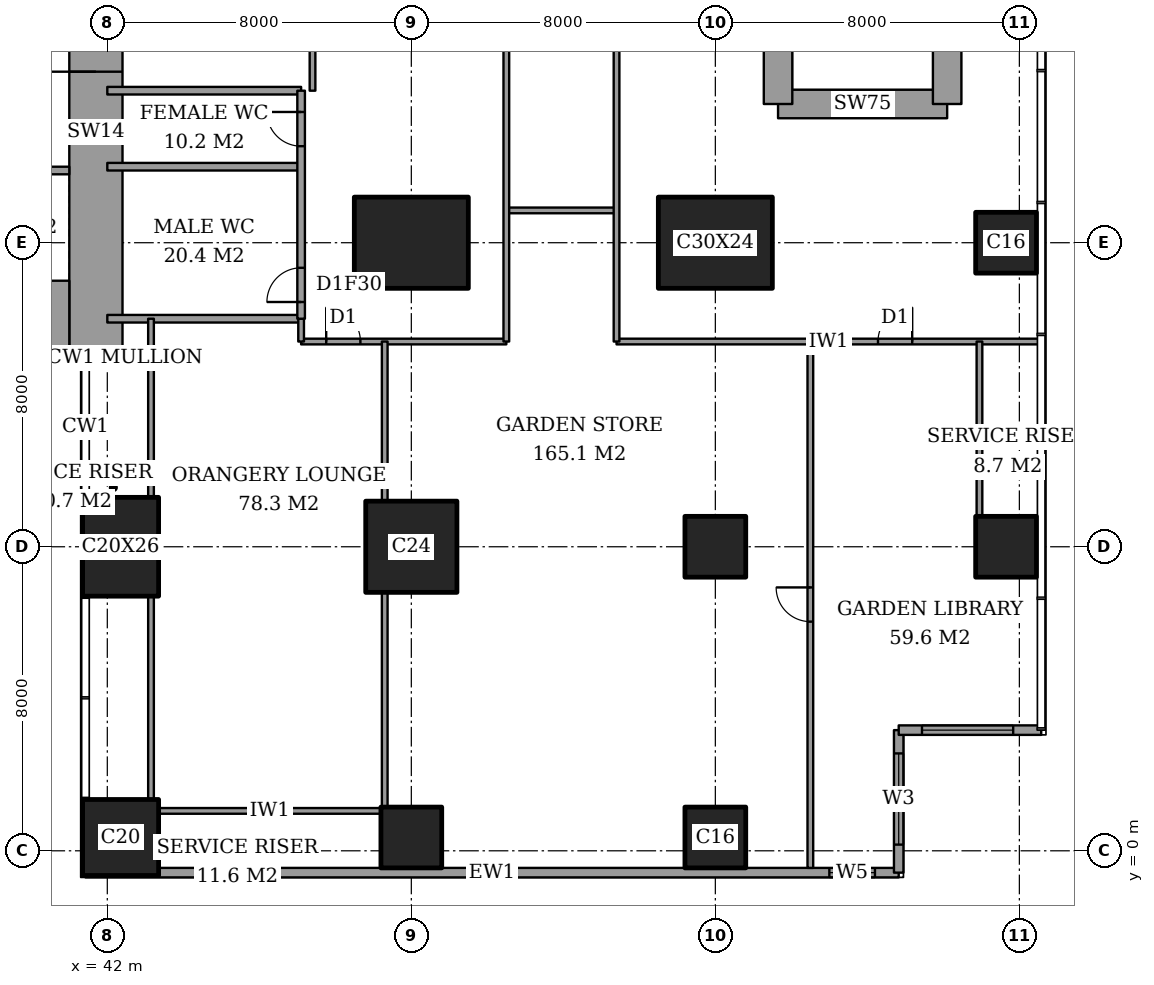
"""IFC4 building model, lengths in metres.
Left out: names, types, materials, properties, quantities, classifications, styles, units other than length and angle.
Written with IfcOpenShell. Run it as: python <this file> out.ifc"""

import sys

from ifc_helpers import new_model, si_unit, direction, frame, frame_2d, origin, origin_2d, place, context, subcontext, project, spatial, rectangle, extrude, element, fill, save


model = new_model("IFC4")
c1 = context("Model", 3, precision=1e-05, world=origin(), true_north=direction((0.0, 1.0)))
c2 = subcontext(c1, "Body", "Model", "MODEL_VIEW")
j1 = project(units=[si_unit("LENGTHUNIT", "METRE"), si_unit("PLANEANGLEUNIT", "RADIAN")], contexts=[c1])
p1 = place(None, origin())
s1 = spatial("IfcSite", under=j1, at=p1, CompositionType="ELEMENT")
p2 = place(p1, origin())
s2 = spatial("IfcBuilding", under=s1, at=p2, CompositionType="ELEMENT")
p3 = place(p2, frame((0.0, 0.0, 225.4)))
s3 = spatial("IfcBuildingStorey", under=s2, at=p3, CompositionType="ELEMENT", Elevation=225.4)
p4 = place(p3, frame((42.35, 0.35, 0.0), z_axis=(0.0, 0.0, 1.0), x_axis=(1.0, 0.0, 0.0)))
e1 = element("IfcColumn", 1, at=p4, inside=s3, PredefinedType="COLUMN", context=c2, shape_type="SweptSolid", body=[
    extrude(rectangle(XDim=2.0, YDim=2.0, at=origin_2d()), origin(), (0.0, 0.0, 1.0), 5.0),
])
p5 = place(p3, frame((42.35, 8.0, 0.0), z_axis=(0.0, 0.0, 1.0), x_axis=(1.0, 0.0, 0.0)))
e2 = element("IfcColumn", 2, at=p5, inside=s3, PredefinedType="COLUMN", context=c2, shape_type="SweptSolid", body=[
    extrude(rectangle(XDim=2.0, YDim=2.6, at=origin_2d()), origin(), (0.0, 0.0, 1.0), 5.0),
])
p6 = place(p3, frame((50.0, 0.35, 0.0), z_axis=(0.0, 0.0, 1.0), x_axis=(1.0, 0.0, 0.0)))
e3 = element("IfcColumn", 3, at=p6, inside=s3, PredefinedType="COLUMN", context=c2, shape_type="SweptSolid", body=[
    extrude(rectangle(XDim=1.6, YDim=1.6, at=origin_2d()), origin(), (0.0, 0.0, 1.0), 5.0),
])
p7 = place(p3, frame((50.0, 8.0, 0.0), z_axis=(0.0, 0.0, 1.0), x_axis=(1.0, 0.0, 0.0)))
e4 = element("IfcColumn", 4, at=p7, inside=s3, PredefinedType="COLUMN", context=c2, shape_type="SweptSolid", body=[
    extrude(rectangle(XDim=2.4, YDim=2.4, at=origin_2d()), origin(), (0.0, 0.0, 1.0), 5.0),
])
p8 = place(p3, frame((50.0, 16.0, 0.0), z_axis=(0.0, 0.0, 1.0), x_axis=(1.0, 0.0, 0.0)))
e5 = element("IfcColumn", 5, at=p8, inside=s3, PredefinedType="COLUMN", context=c2, shape_type="SweptSolid", body=[
    extrude(rectangle(XDim=3.0, YDim=2.4, at=origin_2d()), origin(), (0.0, 0.0, 1.0), 5.0),
])
for number, where, z_axis, x_axis in (
    (6, (58.0, 0.35, 0.0), (0.0, 0.0, 1.0), (1.0, 0.0, 0.0)),
    (7, (58.0, 8.0, 0.0), (0.0, 0.0, 1.0), (1.0, 0.0, 0.0)),
):
    element("IfcColumn", number, at=place(p3, frame(where, z_axis=z_axis, x_axis=x_axis)), inside=s3, PredefinedType="COLUMN", context=c2, shape_type="SweptSolid", body=[
        extrude(rectangle(XDim=1.6, YDim=1.6, at=origin_2d()), origin(), (0.0, 0.0, 1.0), 5.0),
    ])
p9 = place(p3, frame((58.0, 16.0, 0.0), z_axis=(0.0, 0.0, 1.0), x_axis=(1.0, 0.0, 0.0)))
e8 = element("IfcColumn", 8, at=p9, inside=s3, PredefinedType="COLUMN", context=c2, shape_type="SweptSolid", body=[
    extrude(rectangle(XDim=3.0, YDim=2.4, at=origin_2d()), origin(), (0.0, 0.0, 1.0), 5.0),
])
for number, where, z_axis, x_axis in (
    (9, (65.65, 8.0, 0.0), (0.0, 0.0, 1.0), (1.0, 0.0, 0.0)),
    (10, (65.65, 16.0, 0.0), (0.0, 0.0, 1.0), (1.0, 0.0, 0.0)),
):
    element("IfcColumn", number, at=place(p3, frame(where, z_axis=z_axis, x_axis=x_axis)), inside=s3, PredefinedType="COLUMN", context=c2, shape_type="SweptSolid", body=[
        extrude(rectangle(XDim=1.6, YDim=1.6, at=origin_2d()), origin(), (0.0, 0.0, 1.0), 5.0),
    ])
p10 = place(p3, frame((37.85, 14.0, 0.0), z_axis=(0.0, 0.0, 1.0), x_axis=(1.0, 0.0, 0.0)))
e11 = element("IfcWall", 11, at=p10, inside=s3, PredefinedType="SHEAR", context=c2, shape_type="SweptSolid", body=[
    extrude(rectangle(XDim=3.15, YDim=2.0, at=frame_2d((1.575, 0.0))), origin(), (0.0, 0.0, 1.0), 5.0),
])
p11 = place(p3, frame((41.7, 13.0, 0.0), z_axis=(0.0, 0.0, 1.0), x_axis=(0.0, 1.0, 0.0)))
e12 = element("IfcWall", 12, at=p11, inside=s3, PredefinedType="SHEAR", context=c2, shape_type="SweptSolid", body=[
    extrude(rectangle(XDim=11.85, YDim=1.4, at=frame_2d((5.925, 0.0))), origin(), (0.0, 0.0, 1.0), 5.0),
])
p12 = place(p11, frame((7.5, 0.0, 0.0)))
e13 = element("IfcOpeningElement", 13, at=p12, cuts=e12, PredefinedType="OPENING", context=c2, shape_type="SweptSolid", body=[
    extrude(rectangle(XDim=1.8, YDim=2.4, at=frame_2d((0.9, 1.2))), frame((0.0, 0.71, 0.0), z_axis=(0.0, -1.0, 0.0), x_axis=(1.0, 0.0, 0.0)), (0.0, 0.0, 1.0), 1.42),
])
p13 = place(p3, frame((59.65, 19.65, 0.0), z_axis=(0.0, 0.0, 1.0), x_axis=(1.0, 0.0, 0.0)))
e14 = element("IfcWall", 14, at=p13, inside=s3, PredefinedType="SHEAR", context=c2, shape_type="SweptSolid", body=[
    extrude(rectangle(XDim=4.45, YDim=0.75, at=frame_2d((2.225, 0.0))), origin(), (0.0, 0.0, 1.0), 5.0),
])
for number, where, z_axis, x_axis in (
    (15, (64.1, 19.65, 0.0), (0.0, 0.0, 1.0), (0.0, 1.0, 0.0)),
    (16, (59.65, 28.35, 0.0), (0.0, 0.0, 1.0), (0.0, -1.0, 0.0)),
):
    element("IfcWall", number, at=place(p3, frame(where, z_axis=z_axis, x_axis=x_axis)), inside=s3, PredefinedType="SHEAR", context=c2, shape_type="SweptSolid", body=[
        extrude(rectangle(XDim=8.7, YDim=0.75, at=frame_2d((4.35, 0.0))), origin(), (0.0, 0.0, 1.0), 5.0),
    ])
p14 = place(p3, frame((41.425, -0.575, 0.0), z_axis=(0.0, 0.0, 1.0), x_axis=(1.0, 0.0, 0.0)))
e17 = element("IfcWall", 17, at=p14, inside=s3, PredefinedType="SOLIDWALL", context=c2, shape_type="SweptSolid", body=[
    extrude(rectangle(XDim=21.4, YDim=0.25, at=frame_2d((10.7, 0.0))), origin(), (0.0, 0.0, 1.0), 5.0),
])
p15 = place(p14, frame((19.575, 0.0, 0.6)))
e18 = element("IfcOpeningElement", 18, at=p15, cuts=e17, PredefinedType="OPENING", context=c2, shape_type="SweptSolid", body=[
    extrude(rectangle(XDim=1.2, YDim=3.0, at=frame_2d((0.6, 1.5))), frame((0.0, 0.135, 0.0), z_axis=(0.0, -1.0, 0.0), x_axis=(1.0, 0.0, 0.0)), (0.0, 0.0, 1.0), 0.27),
])
p16 = place(p3, frame((62.825, -0.575, 0.0), z_axis=(0.0, 0.0, 1.0), x_axis=(0.0, 1.0, 0.0)))
e19 = element("IfcWall", 19, at=p16, inside=s3, PredefinedType="SOLIDWALL", context=c2, shape_type="SweptSolid", body=[
    extrude(rectangle(XDim=3.75, YDim=0.25, at=frame_2d((1.875, 0.0))), origin(), (0.0, 0.0, 1.0), 5.0),
])
p17 = place(p16, frame((0.738, 0.0, 0.6)))
e20 = element("IfcOpeningElement", 20, at=p17, cuts=e19, PredefinedType="OPENING", context=c2, shape_type="SweptSolid", body=[
    extrude(rectangle(XDim=2.4, YDim=3.0, at=frame_2d((1.2, 1.5))), frame((0.0, 0.135, 0.0), z_axis=(0.0, -1.0, 0.0), x_axis=(1.0, 0.0, 0.0)), (0.0, 0.0, 1.0), 0.27),
])
p18 = place(p3, frame((62.825, 3.175, 0.0), z_axis=(0.0, 0.0, 1.0), x_axis=(1.0, 0.0, 0.0)))
e21 = element("IfcWall", 21, at=p18, inside=s3, PredefinedType="SOLIDWALL", context=c2, shape_type="SweptSolid", body=[
    extrude(rectangle(XDim=3.75, YDim=0.25, at=frame_2d((1.875, 0.0))), origin(), (0.0, 0.0, 1.0), 5.0),
])
p19 = place(p18, frame((0.613, 0.0, 0.6)))
e22 = element("IfcOpeningElement", 22, at=p19, cuts=e21, PredefinedType="OPENING", context=c2, shape_type="SweptSolid", body=[
    extrude(rectangle(XDim=2.4, YDim=3.0, at=frame_2d((1.2, 1.5))), frame((0.0, 0.135, 0.0), z_axis=(0.0, -1.0, 0.0), x_axis=(1.0, 0.0, 0.0)), (0.0, 0.0, 1.0), 0.27),
])
p20 = place(p3, frame((43.35, 1.05, 0.0), z_axis=(0.0, 0.0, 1.0), x_axis=(1.0, 0.0, 0.0)))
e23 = element("IfcWall", 23, at=p20, inside=s3, PredefinedType="PARTITIONING", context=c2, shape_type="SweptSolid", body=[
    extrude(rectangle(XDim=5.85, YDim=0.15, at=frame_2d((2.925, 0.0))), origin(), (0.0, 0.0, 1.0), 4.75),
])
p21 = place(p3, frame((47.1, 13.4, 0.0), z_axis=(0.0, 0.0, 1.0), x_axis=(1.0, 0.0, 0.0)))
e24 = element("IfcWall", 24, at=p21, inside=s3, PredefinedType="PARTITIONING", context=c2, shape_type="SweptSolid", body=[
    extrude(rectangle(XDim=5.4, YDim=0.15, at=frame_2d((2.7, 0.0))), origin(), (0.0, 0.0, 1.0), 4.75),
])
p22 = place(p21, frame((0.66, 0.0, 0.0)))
e25 = element("IfcOpeningElement", 25, at=p22, cuts=e24, PredefinedType="OPENING", context=c2, shape_type="SweptSolid", body=[
    extrude(rectangle(XDim=0.9, YDim=2.1, at=frame_2d((0.45, 1.05))), frame((0.0, 0.085, 0.0), z_axis=(0.0, -1.0, 0.0), x_axis=(1.0, 0.0, 0.0)), (0.0, 0.0, 1.0), 0.17),
])
p23 = place(p3, frame((55.4, 13.4, 0.0), z_axis=(0.0, 0.0, 1.0), x_axis=(1.0, 0.0, 0.0)))
e26 = element("IfcWall", 26, at=p23, inside=s3, PredefinedType="PARTITIONING", context=c2, shape_type="SweptSolid", body=[
    extrude(rectangle(XDim=11.161, YDim=0.15, at=frame_2d((5.581, 0.0))), origin(), (0.0, 0.0, 1.0), 4.75),
])
p24 = place(p23, frame((6.88, 0.0, 0.0)))
e27 = element("IfcOpeningElement", 27, at=p24, cuts=e26, PredefinedType="OPENING", context=c2, shape_type="SweptSolid", body=[
    extrude(rectangle(XDim=0.9, YDim=2.1, at=frame_2d((0.45, 1.05))), frame((0.0, 0.085, 0.0), z_axis=(0.0, -1.0, 0.0), x_axis=(1.0, 0.0, 0.0)), (0.0, 0.0, 1.0), 0.17),
])
p25 = place(p3, frame((42.0, 14.0, 0.0), z_axis=(0.0, 0.0, 1.0), x_axis=(1.0, 0.0, 0.0)))
e28 = element("IfcWall", 28, at=p25, inside=s3, PredefinedType="PARTITIONING", context=c2, shape_type="SweptSolid", body=[
    extrude(rectangle(XDim=5.1, YDim=0.2, at=frame_2d((2.55, 0.0))), origin(), (0.0, 0.0, 1.0), 4.75),
])
p26 = place(p3, frame((52.5, 16.85, 0.0), z_axis=(0.0, 0.0, 1.0), x_axis=(1.0, 0.0, 0.0)))
e29 = element("IfcWall", 29, at=p26, inside=s3, PredefinedType="PARTITIONING", context=c2, shape_type="SweptSolid", body=[
    extrude(rectangle(XDim=2.9, YDim=0.15, at=frame_2d((1.45, 0.0))), origin(), (0.0, 0.0, 1.0), 4.75),
])
for number, where, z_axis, x_axis in (
    (30, (42.0, 18.0, 0.0), (0.0, 0.0, 1.0), (1.0, 0.0, 0.0)),
    (31, (42.0, 20.0, 0.0), (0.0, 0.0, 1.0), (1.0, 0.0, 0.0)),
):
    element("IfcWall", number, at=place(p3, frame(where, z_axis=z_axis, x_axis=x_axis)), inside=s3, PredefinedType="PARTITIONING", context=c2, shape_type="SweptSolid", body=[
        extrude(rectangle(XDim=5.1, YDim=0.2, at=frame_2d((2.55, 0.0))), origin(), (0.0, 0.0, 1.0), 4.75),
    ])
p27 = place(p3, frame((43.15, 1.35, 0.0), z_axis=(0.0, 0.0, 1.0), x_axis=(0.0, 1.0, 0.0)))
e32 = element("IfcWall", 32, at=p27, inside=s3, PredefinedType="PARTITIONING", context=c2, shape_type="SweptSolid", body=[
    extrude(rectangle(XDim=5.35, YDim=0.15, at=frame_2d((2.675, 0.0))), origin(), (0.0, 0.0, 1.0), 4.75),
])
p28 = place(p3, frame((43.15, 9.3, 0.0), z_axis=(0.0, 0.0, 1.0), x_axis=(0.0, 1.0, 0.0)))
e33 = element("IfcWall", 33, at=p28, inside=s3, PredefinedType="PARTITIONING", context=c2, shape_type="SweptSolid", body=[
    extrude(rectangle(XDim=4.7, YDim=0.15, at=frame_2d((2.35, 0.0))), origin(), (0.0, 0.0, 1.0), 4.75),
])
p29 = place(p3, frame((47.1, 14.0, 0.0), z_axis=(0.0, 0.0, 1.0), x_axis=(0.0, 1.0, 0.0)))
e34 = element("IfcWall", 34, at=p29, inside=s3, PredefinedType="PARTITIONING", context=c2, shape_type="SweptSolid", body=[
    extrude(rectangle(XDim=6.0, YDim=0.2, at=frame_2d((3.0, 0.0))), origin(), (0.0, 0.0, 1.0), 4.75),
])
p30 = place(p29, frame((0.44, 0.0, 0.0)))
e35 = element("IfcOpeningElement", 35, at=p30, cuts=e34, PredefinedType="OPENING", context=c2, shape_type="SweptSolid", body=[
    extrude(rectangle(XDim=0.9, YDim=2.1, at=frame_2d((0.45, 1.05))), frame((0.0, 0.11, 0.0), z_axis=(0.0, -1.0, 0.0), x_axis=(1.0, 0.0, 0.0)), (0.0, 0.0, 1.0), 0.22),
])
p31 = place(p29, frame((4.54, 0.0, 0.0)))
e36 = element("IfcOpeningElement", 36, at=p31, cuts=e34, PredefinedType="OPENING", context=c2, shape_type="SweptSolid", body=[
    extrude(rectangle(XDim=0.9, YDim=2.1, at=frame_2d((0.45, 1.05))), frame((0.0, 0.11, 0.0), z_axis=(0.0, -1.0, 0.0), x_axis=(1.0, 0.0, 0.0)), (0.0, 0.0, 1.0), 0.22),
])
p32 = place(p3, frame((47.1, 13.4, 0.0), z_axis=(0.0, 0.0, 1.0), x_axis=(0.0, 1.0, 0.0)))
e37 = element("IfcWall", 37, at=p32, inside=s3, PredefinedType="PARTITIONING", context=c2, shape_type="SweptSolid", body=[
    extrude(rectangle(XDim=0.6, YDim=0.15, at=frame_2d((0.3, 0.0))), origin(), (0.0, 0.0, 1.0), 4.75),
])
p33 = place(p3, frame((47.4, 20.0, 0.0), z_axis=(0.0, 0.0, 1.0), x_axis=(0.0, 1.0, 0.0)))
e38 = element("IfcWall", 38, at=p33, inside=s3, PredefinedType="PARTITIONING", context=c2, shape_type="SweptSolid", body=[
    extrude(rectangle(XDim=8.0, YDim=0.15, at=frame_2d((4.0, 0.0))), origin(), (0.0, 0.0, 1.0), 4.75),
])
p34 = place(p33, frame((3.5, 0.0, 0.0)))
e39 = element("IfcOpeningElement", 39, at=p34, cuts=e38, PredefinedType="OPENING", context=c2, shape_type="SweptSolid", body=[
    extrude(rectangle(XDim=1.0, YDim=2.1, at=frame_2d((0.5, 1.05))), frame((0.0, 0.085, 0.0), z_axis=(0.0, -1.0, 0.0), x_axis=(1.0, 0.0, 0.0)), (0.0, 0.0, 1.0), 0.17),
])
p35 = place(p3, frame((49.3, 1.15, 0.0), z_axis=(0.0, 0.0, 1.0), x_axis=(0.0, 1.0, 0.0)))
e40 = element("IfcWall", 40, at=p35, inside=s3, PredefinedType="PARTITIONING", context=c2, shape_type="SweptSolid", body=[
    extrude(rectangle(XDim=5.65, YDim=0.15, at=frame_2d((2.825, 0.0))), origin(), (0.0, 0.0, 1.0), 4.75),
])
p36 = place(p3, frame((49.3, 9.2, 0.0), z_axis=(0.0, 0.0, 1.0), x_axis=(0.0, 1.0, 0.0)))
e41 = element("IfcWall", 41, at=p36, inside=s3, PredefinedType="PARTITIONING", context=c2, shape_type="SweptSolid", body=[
    extrude(rectangle(XDim=4.2, YDim=0.15, at=frame_2d((2.1, 0.0))), origin(), (0.0, 0.0, 1.0), 4.75),
])
p37 = place(p3, frame((52.5, 13.4, 0.0), z_axis=(0.0, 0.0, 1.0), x_axis=(0.0, 1.0, 0.0)))
e42 = element("IfcWall", 42, at=p37, inside=s3, PredefinedType="PARTITIONING", context=c2, shape_type="SweptSolid", body=[
    extrude(rectangle(XDim=21.2, YDim=0.15, at=frame_2d((10.6, 0.0))), origin(), (0.0, 0.0, 1.0), 4.75),
])
p38 = place(p37, frame((10.15, 0.0, 0.0)))
e43 = element("IfcOpeningElement", 43, at=p38, cuts=e42, PredefinedType="OPENING", context=c2, shape_type="SweptSolid", body=[
    extrude(rectangle(XDim=0.9, YDim=2.1, at=frame_2d((0.45, 1.05))), frame((0.0, 0.085, 0.0), z_axis=(0.0, -1.0, 0.0), x_axis=(1.0, 0.0, 0.0)), (0.0, 0.0, 1.0), 0.17),
])
p39 = place(p3, frame((55.4, 13.4, 0.0), z_axis=(0.0, 0.0, 1.0), x_axis=(0.0, 1.0, 0.0)))
e44 = element("IfcWall", 44, at=p39, inside=s3, PredefinedType="PARTITIONING", context=c2, shape_type="SweptSolid", body=[
    extrude(rectangle(XDim=21.2, YDim=0.15, at=frame_2d((10.6, 0.0))), origin(), (0.0, 0.0, 1.0), 4.75),
])
p40 = place(p39, frame((10.09, 0.0, 0.0)))
e45 = element("IfcOpeningElement", 45, at=p40, cuts=e44, PredefinedType="OPENING", context=c2, shape_type="SweptSolid", body=[
    extrude(rectangle(XDim=1.0, YDim=2.1, at=frame_2d((0.5, 1.05))), frame((0.0, 0.085, 0.0), z_axis=(0.0, -1.0, 0.0), x_axis=(1.0, 0.0, 0.0)), (0.0, 0.0, 1.0), 0.17),
])
p41 = place(p3, frame((60.5, -0.45, 0.0), z_axis=(0.0, 0.0, 1.0), x_axis=(0.0, 1.0, 0.0)))
e46 = element("IfcWall", 46, at=p41, inside=s3, PredefinedType="PARTITIONING", context=c2, shape_type="SweptSolid", body=[
    extrude(rectangle(XDim=13.85, YDim=0.15, at=frame_2d((6.925, 0.0))), origin(), (0.0, 0.0, 1.0), 4.75),
])
p42 = place(p41, frame((6.48, 0.0, 0.0)))
e47 = element("IfcOpeningElement", 47, at=p42, cuts=e46, PredefinedType="OPENING", context=c2, shape_type="SweptSolid", body=[
    extrude(rectangle(XDim=0.9, YDim=2.1, at=frame_2d((0.45, 1.05))), frame((0.0, 0.085, 0.0), z_axis=(0.0, -1.0, 0.0), x_axis=(1.0, 0.0, 0.0)), (0.0, 0.0, 1.0), 0.17),
])
p43 = place(p3, frame((64.95, 8.8, 0.0), z_axis=(0.0, 0.0, 1.0), x_axis=(0.0, 1.0, 0.0)))
e48 = element("IfcWall", 48, at=p43, inside=s3, PredefinedType="PARTITIONING", context=c2, shape_type="SweptSolid", body=[
    extrude(rectangle(XDim=4.6, YDim=0.15, at=frame_2d((2.3, 0.0))), origin(), (0.0, 0.0, 1.0), 4.75),
])
p44 = place(p3, frame((28.3, 17.9, 0.0), z_axis=(0.0, 0.0, 1.0), x_axis=(1.0, 0.0, 0.0)))
e49 = element("IfcWall", 49, at=p44, inside=s3, PredefinedType="PARTITIONING", context=c2, shape_type="SweptSolid", body=[
    extrude(rectangle(XDim=12.7, YDim=0.2, at=frame_2d((6.35, 0.0))), origin(), (0.0, 0.0, 1.0), 5.0),
])
p45 = place(p44, frame((1.05, 0.0, 0.0)))
e50 = element("IfcOpeningElement", 50, at=p45, cuts=e49, PredefinedType="OPENING", context=c2, shape_type="SweptSolid", body=[
    extrude(rectangle(XDim=0.9, YDim=2.1, at=frame_2d((0.45, 1.05))), frame((0.0, 0.11, 0.0), z_axis=(0.0, -1.0, 0.0), x_axis=(1.0, 0.0, 0.0)), (0.0, 0.0, 1.0), 0.22),
])
p46 = place(p44, frame((7.4, 0.0, 0.0)))
e51 = element("IfcOpeningElement", 51, at=p46, cuts=e49, PredefinedType="OPENING", context=c2, shape_type="SweptSolid", body=[
    extrude(rectangle(XDim=1.0, YDim=2.1, at=frame_2d((0.5, 1.05))), frame((0.0, 0.11, 0.0), z_axis=(0.0, -1.0, 0.0), x_axis=(1.0, 0.0, 0.0)), (0.0, 0.0, 1.0), 0.22),
])
p47 = place(p44, frame((10.6, 0.0, 0.0)))
e52 = element("IfcOpeningElement", 52, at=p47, cuts=e49, PredefinedType="OPENING", context=c2, shape_type="SweptSolid", body=[
    extrude(rectangle(XDim=1.2, YDim=2.1, at=frame_2d((0.6, 1.05))), frame((0.0, 0.11, 0.0), z_axis=(0.0, -1.0, 0.0), x_axis=(1.0, 0.0, 0.0)), (0.0, 0.0, 1.0), 0.22),
])
p48 = place(p15, origin())
e53 = element("IfcWindow", 53, at=p48, inside=s3, PartitioningType="SINGLE_PANEL", PredefinedType="WINDOW", context=c2, shape_type="SweptSolid", body=[
    extrude(rectangle(XDim=1.2, YDim=3.0, at=frame_2d((0.6, 1.5))), frame((0.0, 0.03, 0.0), z_axis=(0.0, -1.0, 0.0), x_axis=(1.0, 0.0, 0.0)), (0.0, 0.0, 1.0), 0.06),
])
fill(e18, e53)
p49 = place(p17, origin())
e54 = element("IfcWindow", 54, at=p49, inside=s3, PartitioningType="SINGLE_PANEL", PredefinedType="WINDOW", context=c2, shape_type="SweptSolid", body=[
    extrude(rectangle(XDim=2.4, YDim=3.0, at=frame_2d((1.2, 1.5))), frame((0.0, 0.03, 0.0), z_axis=(0.0, -1.0, 0.0), x_axis=(1.0, 0.0, 0.0)), (0.0, 0.0, 1.0), 0.06),
])
fill(e20, e54)
p50 = place(p19, origin())
e55 = element("IfcWindow", 55, at=p50, inside=s3, PartitioningType="SINGLE_PANEL", PredefinedType="WINDOW", context=c2, shape_type="SweptSolid", body=[
    extrude(rectangle(XDim=2.4, YDim=3.0, at=frame_2d((1.2, 1.5))), frame((0.0, 0.03, 0.0), z_axis=(0.0, -1.0, 0.0), x_axis=(1.0, 0.0, 0.0)), (0.0, 0.0, 1.0), 0.06),
])
fill(e22, e55)
p51 = place(p30, origin())
e56 = element("IfcDoor", 56, at=p51, inside=s3, OperationType="SINGLE_SWING_RIGHT", PredefinedType="DOOR", context=c2, shape_type="SweptSolid", body=[
    extrude(rectangle(XDim=0.9, YDim=2.1, at=frame_2d((0.45, 1.05))), frame((0.0, 0.025, 0.0), z_axis=(0.0, -1.0, 0.0), x_axis=(1.0, 0.0, 0.0)), (0.0, 0.0, 1.0), 0.05),
])
fill(e35, e56)
p52 = place(p31, origin())
e57 = element("IfcDoor", 57, at=p52, inside=s3, OperationType="SINGLE_SWING_LEFT", PredefinedType="DOOR", context=c2, shape_type="SweptSolid", body=[
    extrude(rectangle(XDim=0.9, YDim=2.1, at=frame_2d((0.45, 1.05))), frame((0.0, 0.025, 0.0), z_axis=(0.0, -1.0, 0.0), x_axis=(1.0, 0.0, 0.0)), (0.0, 0.0, 1.0), 0.05),
])
fill(e36, e57)
p53 = place(p24, origin())
e58 = element("IfcDoor", 58, at=p53, inside=s3, OperationType="SINGLE_SWING_LEFT", PredefinedType="DOOR", context=c2, shape_type="SweptSolid", body=[
    extrude(rectangle(XDim=0.9, YDim=2.1, at=frame_2d((0.45, 1.05))), frame((0.0, 0.025, 0.0), z_axis=(0.0, -1.0, 0.0), x_axis=(1.0, 0.0, 0.0)), (0.0, 0.0, 1.0), 0.05),
])
fill(e27, e58)
p54 = place(p42, origin())
e59 = element("IfcDoor", 59, at=p54, inside=s3, OperationType="SINGLE_SWING_LEFT", PredefinedType="DOOR", context=c2, shape_type="SweptSolid", body=[
    extrude(rectangle(XDim=0.9, YDim=2.1, at=frame_2d((0.45, 1.05))), frame((0.0, 0.025, 0.0), z_axis=(0.0, -1.0, 0.0), x_axis=(1.0, 0.0, 0.0)), (0.0, 0.0, 1.0), 0.05),
])
fill(e47, e59)
p55 = place(p22, origin())
e60 = element("IfcDoor", 60, at=p55, inside=s3, OperationType="SINGLE_SWING_RIGHT", PredefinedType="DOOR", context=c2, shape_type="SweptSolid", body=[
    extrude(rectangle(XDim=0.9, YDim=2.1, at=frame_2d((0.45, 1.05))), frame((0.0, 0.025, 0.0), z_axis=(0.0, -1.0, 0.0), x_axis=(1.0, 0.0, 0.0)), (0.0, 0.0, 1.0), 0.05),
])
fill(e25, e60)
p56 = place(p12, origin())
e61 = element("IfcDoor", 61, at=p56, inside=s3, OperationType="DOUBLE_DOOR_DOUBLE_SWING", PredefinedType="DOOR", context=c2, shape_type="SweptSolid", body=[
    extrude(rectangle(XDim=1.8, YDim=2.4, at=frame_2d((0.9, 1.2))), frame((0.0, 0.025, 0.0), z_axis=(0.0, -1.0, 0.0), x_axis=(1.0, 0.0, 0.0)), (0.0, 0.0, 1.0), 0.05),
])
fill(e13, e61)
save(model, sys.argv[1])
